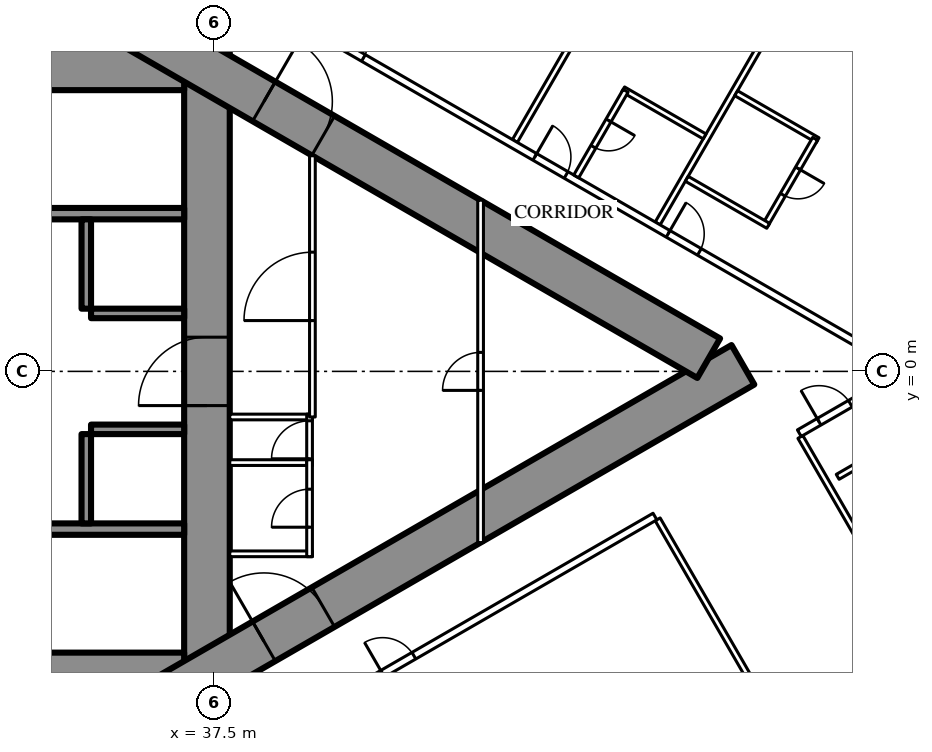
"""IFC4 building model, lengths in metres.
Left out: names, types, materials, properties, quantities, classifications, styles, units other than length and angle.
Written with IfcOpenShell. Run it as: python <this file> out.ifc"""

import sys

from ifc_helpers import new_model, si_unit, direction, frame, frame_2d, origin, place, context, subcontext, project, spatial, rectangle, extrude, element, fill, save


model = new_model("IFC4")
c1 = context("Model", 3, precision=1e-05, world=origin(), true_north=direction((0.0, 1.0)))
c2 = subcontext(c1, "Body", "Model", "MODEL_VIEW")
j1 = project(units=[si_unit("LENGTHUNIT", "METRE"), si_unit("PLANEANGLEUNIT", "RADIAN")], contexts=[c1])
p1 = place(None, origin())
s1 = spatial("IfcSite", under=j1, at=p1, CompositionType="ELEMENT")
p2 = place(p1, origin())
s2 = spatial("IfcBuilding", under=s1, at=p2, CompositionType="ELEMENT")
p3 = place(p2, frame((0.0, 0.0, 56.5)))
s3 = spatial("IfcBuildingStorey", under=s2, at=p3, CompositionType="ELEMENT", Elevation=56.5)
p4 = place(p3, frame((37.3, -8.6, 0.0), z_axis=(0.0, 0.0, 1.0), x_axis=(0.0, 1.0, 0.0)))
e1 = element("IfcWall", 1, at=p4, inside=s3, PredefinedType="SHEAR", context=c2, shape_type="SweptSolid", body=[
    extrude(rectangle(XDim=17.2, YDim=1.2, at=frame_2d((8.6, 0.0))), origin(), (0.0, 0.0, 1.0), 3.5),
])
p5 = place(p4, frame((7.7, 0.0, 0.0)))
e2 = element("IfcOpeningElement", 2, at=p5, cuts=e1, PredefinedType="OPENING", context=c2, shape_type="SweptSolid", body=[
    extrude(rectangle(XDim=1.8, YDim=2.2, at=frame_2d((0.9, 1.1))), frame((0.0, 0.61, 0.0), z_axis=(0.0, -1.0, 0.0), x_axis=(1.0, 0.0, 0.0)), (0.0, 0.0, 1.0), 1.22),
])
p6 = place(p3, frame((28.3, -8.0, 0.0), z_axis=(0.0, 0.0, 1.0), x_axis=(1.0, 0.0, 0.0)))
e3 = element("IfcWall", 3, at=p6, inside=s3, PredefinedType="SHEAR", context=c2, shape_type="SweptSolid", body=[
    extrude(rectangle(XDim=8.4, YDim=1.2, at=frame_2d((4.2, 0.0))), origin(), (0.0, 0.0, 1.0), 3.5),
])
p7 = place(p6, frame((0.25, 0.0, 0.0)))
e4 = element("IfcOpeningElement", 4, at=p7, cuts=e3, PredefinedType="OPENING", context=c2, shape_type="SweptSolid", body=[
    extrude(rectangle(XDim=1.0, YDim=2.2, at=frame_2d((0.5, 1.1))), frame((0.0, 0.61, 0.0), z_axis=(0.0, -1.0, 0.0), x_axis=(1.0, 0.0, 0.0)), (0.0, 0.0, 1.0), 1.22),
])
p8 = place(p3, frame((28.3, 8.0, 0.0), z_axis=(0.0, 0.0, 1.0), x_axis=(1.0, 0.0, 0.0)))
e5 = element("IfcWall", 5, at=p8, inside=s3, PredefinedType="SHEAR", context=c2, shape_type="SweptSolid", body=[
    extrude(rectangle(XDim=8.4, YDim=1.2, at=frame_2d((4.2, 0.0))), origin(), (0.0, 0.0, 1.0), 3.5),
])
p9 = place(p8, frame((0.25, 0.0, 0.0)))
e6 = element("IfcOpeningElement", 6, at=p9, cuts=e5, PredefinedType="OPENING", context=c2, shape_type="SweptSolid", body=[
    extrude(rectangle(XDim=1.0, YDim=2.2, at=frame_2d((0.5, 1.1))), frame((0.0, 0.61, 0.0), z_axis=(0.0, -1.0, 0.0), x_axis=(1.0, 0.0, 0.0)), (0.0, 0.0, 1.0), 1.22),
])
for number, where, z_axis, x_axis in (
    (7, (28.3, -4.15, 0.0), (0.0, 0.0, 1.0), (1.0, 0.0, 0.0)),
    (8, (28.3, 4.15, 0.0), (0.0, 0.0, 1.0), (1.0, 0.0, 0.0)),
):
    element("IfcWall", number, at=place(p3, frame(where, z_axis=z_axis, x_axis=x_axis)), inside=s3, PredefinedType="SHEAR", context=c2, shape_type="SweptSolid", body=[
        extrude(rectangle(XDim=8.4, YDim=0.3, at=frame_2d((4.2, 0.0))), origin(), (0.0, 0.0, 1.0), 3.5),
    ])
p10 = place(p3, frame((34.125, -4.0, 0.0), z_axis=(0.0, 0.0, 1.0), x_axis=(0.0, 1.0, 0.0)))
e9 = element("IfcWall", 9, at=p10, inside=s3, PredefinedType="SHEAR", context=c2, shape_type="SweptSolid", body=[
    extrude(rectangle(XDim=2.35, YDim=0.25, at=frame_2d((1.175, 0.0))), origin(), (0.0, 0.0, 1.0), 3.5),
])
p11 = place(p3, frame((34.25, -1.525, 0.0), z_axis=(0.0, 0.0, 1.0), x_axis=(1.0, 0.0, 0.0)))
e10 = element("IfcWall", 10, at=p11, inside=s3, PredefinedType="SHEAR", context=c2, shape_type="SweptSolid", body=[
    extrude(rectangle(XDim=2.45, YDim=0.25, at=frame_2d((1.225, 0.0))), origin(), (0.0, 0.0, 1.0), 3.5),
])
p12 = place(p3, frame((34.125, 1.65, 0.0), z_axis=(0.0, 0.0, 1.0), x_axis=(0.0, 1.0, 0.0)))
e11 = element("IfcWall", 11, at=p12, inside=s3, PredefinedType="SHEAR", context=c2, shape_type="SweptSolid", body=[
    extrude(rectangle(XDim=2.35, YDim=0.25, at=frame_2d((1.175, 0.0))), origin(), (0.0, 0.0, 1.0), 3.5),
])
p13 = place(p3, frame((34.25, 1.525, 0.0), z_axis=(0.0, 0.0, 1.0), x_axis=(1.0, 0.0, 0.0)))
e12 = element("IfcWall", 12, at=p13, inside=s3, PredefinedType="SHEAR", context=c2, shape_type="SweptSolid", body=[
    extrude(rectangle(XDim=2.45, YDim=0.25, at=frame_2d((1.225, 0.0))), origin(), (0.0, 0.0, 1.0), 3.5),
])
p14 = place(p3, frame((27.2, -13.8, 0.0), z_axis=(0.0, 0.0, 1.0), x_axis=(0.866027159892, 0.499996958321, 0.0)))
e13 = element("IfcWall", 13, at=p14, inside=s3, PredefinedType="SHEAR", context=c2, shape_type="SweptSolid", body=[
    extrude(rectangle(XDim=27.947, YDim=1.2, at=frame_2d((13.973, 0.0))), origin(), (0.0, 0.0, 1.0), 3.5),
])
p15 = place(p14, frame((4.6, 0.0, 0.0)))
e14 = element("IfcOpeningElement", 14, at=p15, cuts=e13, PredefinedType="OPENING", context=c2, shape_type="SweptSolid", body=[
    extrude(rectangle(XDim=1.0, YDim=2.2, at=frame_2d((0.5, 1.1))), frame((0.0, 0.61, 0.0), z_axis=(0.0, -1.0, 0.0), x_axis=(1.0, 0.0, 0.0)), (0.0, 0.0, 1.0), 1.22),
])
p16 = place(p14, frame((13.395, 0.0, 0.0)))
e15 = element("IfcOpeningElement", 15, at=p16, cuts=e13, PredefinedType="OPENING", context=c2, shape_type="SweptSolid", body=[
    extrude(rectangle(XDim=1.8, YDim=2.2, at=frame_2d((0.9, 1.1))), frame((0.0, 0.61, 0.0), z_axis=(0.0, -1.0, 0.0), x_axis=(1.0, 0.0, 0.0)), (0.0, 0.0, 1.0), 1.22),
])
p17 = place(p3, frame((27.2, 13.8, 0.0), z_axis=(0.0, 0.0, 1.0), x_axis=(0.866024515034, -0.500001539357, 0.0)))
e16 = element("IfcWall", 16, at=p17, inside=s3, PredefinedType="SHEAR", context=c2, shape_type="SweptSolid", body=[
    extrude(rectangle(XDim=26.907, YDim=1.2, at=frame_2d((13.454, 0.0))), origin(), (0.0, 0.0, 1.0), 3.5),
])
p18 = place(p17, frame((4.6, 0.0, 0.0)))
e17 = element("IfcOpeningElement", 17, at=p18, cuts=e16, PredefinedType="OPENING", context=c2, shape_type="SweptSolid", body=[
    extrude(rectangle(XDim=1.0, YDim=2.2, at=frame_2d((0.5, 1.1))), frame((0.0, 0.61, 0.0), z_axis=(0.0, -1.0, 0.0), x_axis=(1.0, 0.0, 0.0)), (0.0, 0.0, 1.0), 1.22),
])
p19 = place(p17, frame((13.395, 0.0, 0.0)))
e18 = element("IfcOpeningElement", 18, at=p19, cuts=e16, PredefinedType="OPENING", context=c2, shape_type="SweptSolid", body=[
    extrude(rectangle(XDim=1.8, YDim=2.2, at=frame_2d((0.9, 1.1))), frame((0.0, 0.61, 0.0), z_axis=(0.0, -1.0, 0.0), x_axis=(1.0, 0.0, 0.0)), (0.0, 0.0, 1.0), 1.22),
])
p20 = place(p3, frame((49.159, -3.893, 0.0), z_axis=(0.0, 0.0, 1.0), x_axis=(0.499998773722, -0.866026111775, 0.0)))
e19 = element("IfcWall", 19, at=p20, inside=s3, PredefinedType="PARTITIONING", context=c2, shape_type="SweptSolid", body=[
    extrude(rectangle(XDim=9.892, YDim=0.15, at=frame_2d((4.946, 0.0))), origin(), (0.0, 0.0, 1.0), 2.25),
])
p21 = place(p3, frame((52.915, -1.725, 0.0), z_axis=(0.0, 0.0, 1.0), x_axis=(0.499997163113, -0.866027041656, 0.0)))
e20 = element("IfcWall", 20, at=p21, inside=s3, PredefinedType="PARTITIONING", context=c2, shape_type="SweptSolid", body=[
    extrude(rectangle(XDim=12.591, YDim=0.15, at=frame_2d((6.295, 0.0))), origin(), (0.0, 0.0, 1.0), 3.25),
])
p22 = place(p3, frame((45.403, 6.062, 0.0), z_axis=(0.0, 0.0, 1.0), x_axis=(0.500013434677, 0.866017647131, 0.0)))
e21 = element("IfcWall", 21, at=p22, inside=s3, PredefinedType="PARTITIONING", context=c2, shape_type="SweptSolid", body=[
    extrude(rectangle(XDim=9.902, YDim=0.15, at=frame_2d((4.951, 0.0))), origin(), (0.0, 0.0, 1.0), 2.25),
])
p23 = place(p3, frame((49.159, 3.893, 0.0), z_axis=(0.0, 0.0, 1.0), x_axis=(0.499995664361, 0.866027906952, 0.0)))
e22 = element("IfcWall", 22, at=p23, inside=s3, PredefinedType="PARTITIONING", context=c2, shape_type="SweptSolid", body=[
    extrude(rectangle(XDim=12.711, YDim=0.15, at=frame_2d((6.356, 0.0))), origin(), (0.0, 0.0, 1.0), 3.25),
])
p24 = place(p3, frame((36.834, 10.894, 0.0), z_axis=(0.0, 0.0, 1.0), x_axis=(0.866028157229, -0.499995230863, 0.0)))
e23 = element("IfcWall", 23, at=p24, inside=s3, PredefinedType="PARTITIONING", context=c2, shape_type="SweptSolid", body=[
    extrude(rectangle(XDim=21.667, YDim=0.2, at=frame_2d((10.833, 0.0))), origin(), (0.0, 0.0, 1.0), 3.25),
])
p25 = place(p24, frame((14.55, 0.0, 0.0)))
e24 = element("IfcOpeningElement", 24, at=p25, cuts=e23, PredefinedType="OPENING", context=c2, shape_type="SweptSolid", body=[
    extrude(rectangle(XDim=0.95, YDim=2.2, at=frame_2d((0.475, 1.1))), frame((0.0, 0.11, 0.0), z_axis=(0.0, -1.0, 0.0), x_axis=(1.0, 0.0, 0.0)), (0.0, 0.0, 1.0), 0.22),
])
p26 = place(p24, frame((10.5, 0.0, 0.0)))
e25 = element("IfcOpeningElement", 25, at=p26, cuts=e23, PredefinedType="OPENING", context=c2, shape_type="SweptSolid", body=[
    extrude(rectangle(XDim=0.95, YDim=2.2, at=frame_2d((0.475, 1.1))), frame((0.0, 0.11, 0.0), z_axis=(0.0, -1.0, 0.0), x_axis=(1.0, 0.0, 0.0)), (0.0, 0.0, 1.0), 0.22),
])
p27 = place(p24, frame((4.292, 0.0, 0.0)))
e26 = element("IfcOpeningElement", 26, at=p27, cuts=e23, PredefinedType="OPENING", context=c2, shape_type="SweptSolid", body=[
    extrude(rectangle(XDim=1.0, YDim=2.2, at=frame_2d((0.5, 1.1))), frame((0.0, 0.11, 0.0), z_axis=(0.0, -1.0, 0.0), x_axis=(1.0, 0.0, 0.0)), (0.0, 0.0, 1.0), 0.22),
])
p28 = place(p24, frame((0.246, 0.0, 0.0)))
e27 = element("IfcOpeningElement", 27, at=p28, cuts=e23, PredefinedType="OPENING", context=c2, shape_type="SweptSolid", body=[
    extrude(rectangle(XDim=0.9, YDim=2.2, at=frame_2d((0.45, 1.1))), frame((0.0, 0.11, 0.0), z_axis=(0.0, -1.0, 0.0), x_axis=(1.0, 0.0, 0.0)), (0.0, 0.0, 1.0), 0.22),
])
p29 = place(p3, frame((37.96, -10.243, 0.0), z_axis=(0.0, 0.0, 1.0), x_axis=(0.866030548046, 0.499991089772, 0.0)))
e28 = element("IfcWall", 28, at=p29, inside=s3, PredefinedType="PARTITIONING", context=c2, shape_type="SweptSolid", body=[
    extrude(rectangle(XDim=12.849, YDim=0.2, at=frame_2d((6.425, 0.0))), origin(), (0.0, 0.0, 1.0), 3.25),
])
p30 = place(p29, frame((4.575, 0.0, 0.0)))
e29 = element("IfcOpeningElement", 29, at=p30, cuts=e28, PredefinedType="OPENING", context=c2, shape_type="SweptSolid", body=[
    extrude(rectangle(XDim=0.95, YDim=2.2, at=frame_2d((0.475, 1.1))), frame((0.0, 0.11, 0.0), z_axis=(0.0, -1.0, 0.0), x_axis=(1.0, 0.0, 0.0)), (0.0, 0.0, 1.0), 0.22),
])
p31 = place(p29, frame((0.6, 0.0, 0.0)))
e30 = element("IfcOpeningElement", 30, at=p31, cuts=e28, PredefinedType="OPENING", context=c2, shape_type="SweptSolid", body=[
    extrude(rectangle(XDim=0.95, YDim=2.2, at=frame_2d((0.475, 1.1))), frame((0.0, 0.11, 0.0), z_axis=(0.0, -1.0, 0.0), x_axis=(1.0, 0.0, 0.0)), (0.0, 0.0, 1.0), 0.22),
])
p32 = place(p3, frame((52.886, -1.626, 0.0), z_axis=(0.0, 0.0, 1.0), x_axis=(0.866030540913, 0.499991102127, 0.0)))
e31 = element("IfcWall", 31, at=p32, inside=s3, PredefinedType="PARTITIONING", context=c2, shape_type="SweptSolid", body=[
    extrude(rectangle(XDim=3.251, YDim=0.2, at=frame_2d((1.626, 0.0))), origin(), (0.0, 0.0, 1.0), 3.25),
])
p33 = place(p32, frame((0.6, 0.0, 0.0)))
e32 = element("IfcOpeningElement", 32, at=p33, cuts=e31, PredefinedType="OPENING", context=c2, shape_type="SweptSolid", body=[
    extrude(rectangle(XDim=0.95, YDim=2.2, at=frame_2d((0.475, 1.1))), frame((0.0, 0.11, 0.0), z_axis=(0.0, -1.0, 0.0), x_axis=(1.0, 0.0, 0.0)), (0.0, 0.0, 1.0), 0.22),
])
p34 = place(p3, frame((53.896, -2.775, 0.0), z_axis=(0.0, 0.0, 1.0), x_axis=(0.866006523861, 0.500032699561, 0.0)))
e33 = element("IfcWall", 33, at=p34, inside=s3, PredefinedType="PARTITIONING", context=c2, shape_type="SweptSolid", body=[
    extrude(rectangle(XDim=2.475, YDim=0.15, at=frame_2d((1.237, 0.0))), origin(), (0.0, 0.0, 1.0), 3.25),
])
p35 = place(p3, frame((51.224, 7.32, 0.0), z_axis=(0.0, 0.0, 1.0), x_axis=(0.866031185235, -0.4999899861, 0.0)))
e34 = element("IfcWall", 34, at=p35, inside=s3, PredefinedType="PARTITIONING", context=c2, shape_type="SweptSolid", body=[
    extrude(rectangle(XDim=2.475, YDim=0.15, at=frame_2d((1.238, 0.0))), origin(), (0.0, 0.0, 1.0), 3.25),
])
p36 = place(p3, frame((52.003, 3.868, 0.0), z_axis=(0.0, 0.0, 1.0), x_axis=(0.500047596559, 0.865997922154, 0.0)))
e35 = element("IfcWall", 35, at=p36, inside=s3, PredefinedType="PARTITIONING", context=c2, shape_type="SweptSolid", body=[
    extrude(rectangle(XDim=2.6, YDim=0.15, at=frame_2d((1.3, 0.0))), origin(), (0.0, 0.0, 1.0), 3.25),
])
p37 = place(p36, frame((0.9, 0.0, 0.0)))
e36 = element("IfcOpeningElement", 36, at=p37, cuts=e35, PredefinedType="OPENING", context=c2, shape_type="SweptSolid", body=[
    extrude(rectangle(XDim=0.8, YDim=2.2, at=frame_2d((0.4, 1.1))), frame((0.0, 0.085, 0.0), z_axis=(0.0, -1.0, 0.0), x_axis=(1.0, 0.0, 0.0)), (0.0, 0.0, 1.0), 0.17),
])
for number, where, z_axis, x_axis in (
    (37, (49.925, 5.068, 0.0), (0.0, 0.0, 1.0), (0.866, -0.5, 0.0)),
    (38, (48.251, 7.42, 0.0), (0.0, 0.0, 1.0), (0.866, -0.5, 0.0)),
):
    element("IfcWall", number, at=place(p3, frame(where, z_axis=z_axis, x_axis=x_axis)), inside=s3, PredefinedType="PARTITIONING", context=c2, shape_type="SweptSolid", body=[
        extrude(rectangle(XDim=2.475, YDim=0.15, at=frame_2d((1.237, 0.0))), origin(), (0.0, 0.0, 1.0), 3.25),
    ])
p38 = place(p3, frame((47.016, 5.13, 0.0), z_axis=(0.0, 0.0, 1.0), x_axis=(0.500006934395, 0.866021400173, 0.0)))
e39 = element("IfcWall", 39, at=p38, inside=s3, PredefinedType="PARTITIONING", context=c2, shape_type="SweptSolid", body=[
    extrude(rectangle(XDim=2.6, YDim=0.15, at=frame_2d((1.3, 0.0))), origin(), (0.0, 0.0, 1.0), 3.25),
])
p39 = place(p38, frame((0.9, 0.0, 0.0)))
e40 = element("IfcOpeningElement", 40, at=p39, cuts=e39, PredefinedType="OPENING", context=c2, shape_type="SweptSolid", body=[
    extrude(rectangle(XDim=0.8, YDim=2.2, at=frame_2d((0.4, 1.1))), frame((0.0, 0.085, 0.0), z_axis=(0.0, -1.0, 0.0), x_axis=(1.0, 0.0, 0.0)), (0.0, 0.0, 1.0), 0.17),
])
for number, where, z_axis, x_axis in (
    (41, (37.9, -1.2, 0.0), (0.0, 0.0, 1.0), (1.0, 0.0, 0.0)),
    (42, (37.9, -2.4, 0.0), (0.0, 0.0, 1.0), (1.0, 0.0, 0.0)),
    (43, (37.9, -4.8, 0.0), (0.0, 0.0, 1.0), (1.0, 0.0, 0.0)),
):
    element("IfcWall", number, at=place(p3, frame(where, z_axis=z_axis, x_axis=x_axis)), inside=s3, PredefinedType="PARTITIONING", context=c2, shape_type="SweptSolid", body=[
        extrude(rectangle(XDim=2.175, YDim=0.15, at=frame_2d((1.087, 0.0))), origin(), (0.0, 0.0, 1.0), 3.25),
    ])
p40 = place(p3, frame((40.0, -2.475, 0.0), z_axis=(0.0, 0.0, 1.0), x_axis=(0.0, 1.0, 0.0)))
e44 = element("IfcWall", 44, at=p40, inside=s3, PredefinedType="PARTITIONING", context=c2, shape_type="SweptSolid", body=[
    extrude(rectangle(XDim=1.35, YDim=0.15, at=frame_2d((0.675, 0.0))), origin(), (0.0, 0.0, 1.0), 3.25),
])
p41 = place(p40, frame((0.175, 0.0, 0.0)))
e45 = element("IfcOpeningElement", 45, at=p41, cuts=e44, PredefinedType="OPENING", context=c2, shape_type="SweptSolid", body=[
    extrude(rectangle(XDim=1.0, YDim=2.2, at=frame_2d((0.5, 1.1))), frame((0.0, 0.085, 0.0), z_axis=(0.0, -1.0, 0.0), x_axis=(1.0, 0.0, 0.0)), (0.0, 0.0, 1.0), 0.17),
])
p42 = place(p3, frame((40.0, -4.875, 0.0), z_axis=(0.0, 0.0, 1.0), x_axis=(0.0, 1.0, 0.0)))
e46 = element("IfcWall", 46, at=p42, inside=s3, PredefinedType="PARTITIONING", context=c2, shape_type="SweptSolid", body=[
    extrude(rectangle(XDim=2.55, YDim=0.15, at=frame_2d((1.275, 0.0))), origin(), (0.0, 0.0, 1.0), 3.25),
])
p43 = place(p42, frame((0.775, 0.0, 0.0)))
e47 = element("IfcOpeningElement", 47, at=p43, cuts=e46, PredefinedType="OPENING", context=c2, shape_type="SweptSolid", body=[
    extrude(rectangle(XDim=1.0, YDim=2.2, at=frame_2d((0.5, 1.1))), frame((0.0, 0.085, 0.0), z_axis=(0.0, -1.0, 0.0), x_axis=(1.0, 0.0, 0.0)), (0.0, 0.0, 1.0), 0.17),
])
p44 = place(p3, frame((40.075, -1.2, 0.0), z_axis=(0.0, 0.0, 1.0), x_axis=(0.0, 1.0, 0.0)))
e48 = element("IfcWall", 48, at=p44, inside=s3, PredefinedType="PARTITIONING", context=c2, shape_type="SweptSolid", body=[
    extrude(rectangle(XDim=6.874, YDim=0.15, at=frame_2d((3.437, 0.0))), origin(), (0.0, 0.0, 1.0), 3.25),
])
p45 = place(p44, frame((2.537, 0.0, 0.0)))
e49 = element("IfcOpeningElement", 49, at=p45, cuts=e48, PredefinedType="OPENING", context=c2, shape_type="SweptSolid", body=[
    extrude(rectangle(XDim=1.8, YDim=2.2, at=frame_2d((0.9, 1.1))), frame((0.0, 0.085, 0.0), z_axis=(0.0, -1.0, 0.0), x_axis=(1.0, 0.0, 0.0)), (0.0, 0.0, 1.0), 0.17),
])
p46 = place(p3, frame((44.5, -4.505, 0.0), z_axis=(0.0, 0.0, 1.0), x_axis=(0.0, 1.0, 0.0)))
e50 = element("IfcWall", 50, at=p46, inside=s3, PredefinedType="PARTITIONING", context=c2, shape_type="SweptSolid", body=[
    extrude(rectangle(XDim=9.009, YDim=0.15, at=frame_2d((4.505, 0.0))), origin(), (0.0, 0.0, 1.0), 2.45),
])
p47 = place(p46, frame((4.005, 0.0, 0.0)))
e51 = element("IfcOpeningElement", 51, at=p47, cuts=e50, PredefinedType="OPENING", context=c2, shape_type="SweptSolid", body=[
    extrude(rectangle(XDim=1.0, YDim=2.2, at=frame_2d((0.5, 1.1))), frame((0.0, 0.085, 0.0), z_axis=(0.0, -1.0, 0.0), x_axis=(1.0, 0.0, 0.0)), (0.0, 0.0, 1.0), 0.17),
])
p48 = place(p30, origin())
e52 = element("IfcDoor", 52, at=p48, inside=s3, OperationType="SINGLE_SWING_LEFT", PredefinedType="DOOR", context=c2, shape_type="SweptSolid", body=[
    extrude(rectangle(XDim=0.95, YDim=2.2, at=frame_2d((0.475, 1.1))), frame((0.0, 0.025, 0.0), z_axis=(0.0, -1.0, 0.0), x_axis=(1.0, 0.0, 0.0)), (0.0, 0.0, 1.0), 0.05),
])
fill(e29, e52)
p49 = place(p33, origin())
e53 = element("IfcDoor", 53, at=p49, inside=s3, OperationType="SINGLE_SWING_LEFT", PredefinedType="DOOR", context=c2, shape_type="SweptSolid", body=[
    extrude(rectangle(XDim=0.95, YDim=2.2, at=frame_2d((0.475, 1.1))), frame((0.0, 0.025, 0.0), z_axis=(0.0, -1.0, 0.0), x_axis=(1.0, 0.0, 0.0)), (0.0, 0.0, 1.0), 0.05),
])
fill(e32, e53)
p50 = place(p37, origin())
e54 = element("IfcDoor", 54, at=p50, inside=s3, OperationType="SINGLE_SWING_RIGHT", PredefinedType="DOOR", context=c2, shape_type="SweptSolid", body=[
    extrude(rectangle(XDim=0.8, YDim=2.2, at=frame_2d((0.4, 1.1))), frame((0.0, 0.025, 0.0), z_axis=(0.0, -1.0, 0.0), x_axis=(1.0, 0.0, 0.0)), (0.0, 0.0, 1.0), 0.05),
])
fill(e36, e54)
p51 = place(p25, origin())
e55 = element("IfcDoor", 55, at=p51, inside=s3, OperationType="SINGLE_SWING_LEFT", PredefinedType="DOOR", context=c2, shape_type="SweptSolid", body=[
    extrude(rectangle(XDim=0.95, YDim=2.2, at=frame_2d((0.475, 1.1))), frame((0.0, 0.025, 0.0), z_axis=(0.0, -1.0, 0.0), x_axis=(1.0, 0.0, 0.0)), (0.0, 0.0, 1.0), 0.05),
])
fill(e24, e55)
p52 = place(p39, origin())
e56 = element("IfcDoor", 56, at=p52, inside=s3, OperationType="SINGLE_SWING_RIGHT", PredefinedType="DOOR", context=c2, shape_type="SweptSolid", body=[
    extrude(rectangle(XDim=0.8, YDim=2.2, at=frame_2d((0.4, 1.1))), frame((0.0, 0.025, 0.0), z_axis=(0.0, -1.0, 0.0), x_axis=(1.0, 0.0, 0.0)), (0.0, 0.0, 1.0), 0.05),
])
fill(e40, e56)
p53 = place(p26, origin())
e57 = element("IfcDoor", 57, at=p53, inside=s3, OperationType="SINGLE_SWING_LEFT", PredefinedType="DOOR", context=c2, shape_type="SweptSolid", body=[
    extrude(rectangle(XDim=0.95, YDim=2.2, at=frame_2d((0.475, 1.1))), frame((0.0, 0.025, 0.0), z_axis=(0.0, -1.0, 0.0), x_axis=(1.0, 0.0, 0.0)), (0.0, 0.0, 1.0), 0.05),
])
fill(e25, e57)
p54 = place(p27, origin())
e58 = element("IfcDoor", 58, at=p54, inside=s3, OperationType="SINGLE_SWING_LEFT", PredefinedType="DOOR", context=c2, shape_type="SweptSolid", body=[
    extrude(rectangle(XDim=1.0, YDim=2.2, at=frame_2d((0.5, 1.1))), frame((0.0, 0.025, 0.0), z_axis=(0.0, -1.0, 0.0), x_axis=(1.0, 0.0, 0.0)), (0.0, 0.0, 1.0), 0.05),
])
fill(e26, e58)
p55 = place(p41, origin())
e59 = element("IfcDoor", 59, at=p55, inside=s3, OperationType="SINGLE_SWING_LEFT", PredefinedType="DOOR", context=c2, shape_type="SweptSolid", body=[
    extrude(rectangle(XDim=1.0, YDim=2.2, at=frame_2d((0.5, 1.1))), frame((0.0, 0.025, 0.0), z_axis=(0.0, -1.0, 0.0), x_axis=(1.0, 0.0, 0.0)), (0.0, 0.0, 1.0), 0.05),
])
fill(e45, e59)
p56 = place(p43, origin())
e60 = element("IfcDoor", 60, at=p56, inside=s3, OperationType="SINGLE_SWING_LEFT", PredefinedType="DOOR", context=c2, shape_type="SweptSolid", body=[
    extrude(rectangle(XDim=1.0, YDim=2.2, at=frame_2d((0.5, 1.1))), frame((0.0, 0.025, 0.0), z_axis=(0.0, -1.0, 0.0), x_axis=(1.0, 0.0, 0.0)), (0.0, 0.0, 1.0), 0.05),
])
fill(e47, e60)
p57 = place(p45, origin())
e61 = element("IfcDoor", 61, at=p57, inside=s3, OperationType="DOUBLE_DOOR_SINGLE_SWING", PredefinedType="DOOR", context=c2, shape_type="SweptSolid", body=[
    extrude(rectangle(XDim=1.8, YDim=2.2, at=frame_2d((0.9, 1.1))), frame((0.0, 0.025, 0.0), z_axis=(0.0, -1.0, 0.0), x_axis=(1.0, 0.0, 0.0)), (0.0, 0.0, 1.0), 0.05),
])
fill(e49, e61)
p58 = place(p47, origin())
e62 = element("IfcDoor", 62, at=p58, inside=s3, OperationType="SINGLE_SWING_LEFT", PredefinedType="DOOR", context=c2, shape_type="SweptSolid", body=[
    extrude(rectangle(XDim=1.0, YDim=2.2, at=frame_2d((0.5, 1.1))), frame((0.0, 0.025, 0.0), z_axis=(0.0, -1.0, 0.0), x_axis=(1.0, 0.0, 0.0)), (0.0, 0.0, 1.0), 0.05),
])
fill(e51, e62)
p59 = place(p16, origin())
e63 = element("IfcDoor", 63, at=p59, inside=s3, OperationType="DOUBLE_DOOR_SINGLE_SWING", PredefinedType="DOOR", context=c2, shape_type="SweptSolid", body=[
    extrude(rectangle(XDim=1.8, YDim=2.2, at=frame_2d((0.9, 1.1))), frame((0.0, 0.025, 0.0), z_axis=(0.0, -1.0, 0.0), x_axis=(1.0, 0.0, 0.0)), (0.0, 0.0, 1.0), 0.05),
])
fill(e15, e63)
p60 = place(p19, origin())
e64 = element("IfcDoor", 64, at=p60, inside=s3, OperationType="DOUBLE_DOOR_SINGLE_SWING", PredefinedType="DOOR", context=c2, shape_type="SweptSolid", body=[
    extrude(rectangle(XDim=1.8, YDim=2.2, at=frame_2d((0.9, 1.1))), frame((0.0, 0.025, 0.0), z_axis=(0.0, -1.0, 0.0), x_axis=(1.0, 0.0, 0.0)), (0.0, 0.0, 1.0), 0.05),
])
fill(e18, e64)
p61 = place(p5, origin())
e65 = element("IfcDoor", 65, at=p61, inside=s3, OperationType="DOUBLE_DOOR_SINGLE_SWING", PredefinedType="DOOR", context=c2, shape_type="SweptSolid", body=[
    extrude(rectangle(XDim=1.8, YDim=2.2, at=frame_2d((0.9, 1.1))), frame((0.0, 0.025, 0.0), z_axis=(0.0, -1.0, 0.0), x_axis=(1.0, 0.0, 0.0)), (0.0, 0.0, 1.0), 0.05),
])
fill(e2, e65)
save(model, sys.argv[1])
